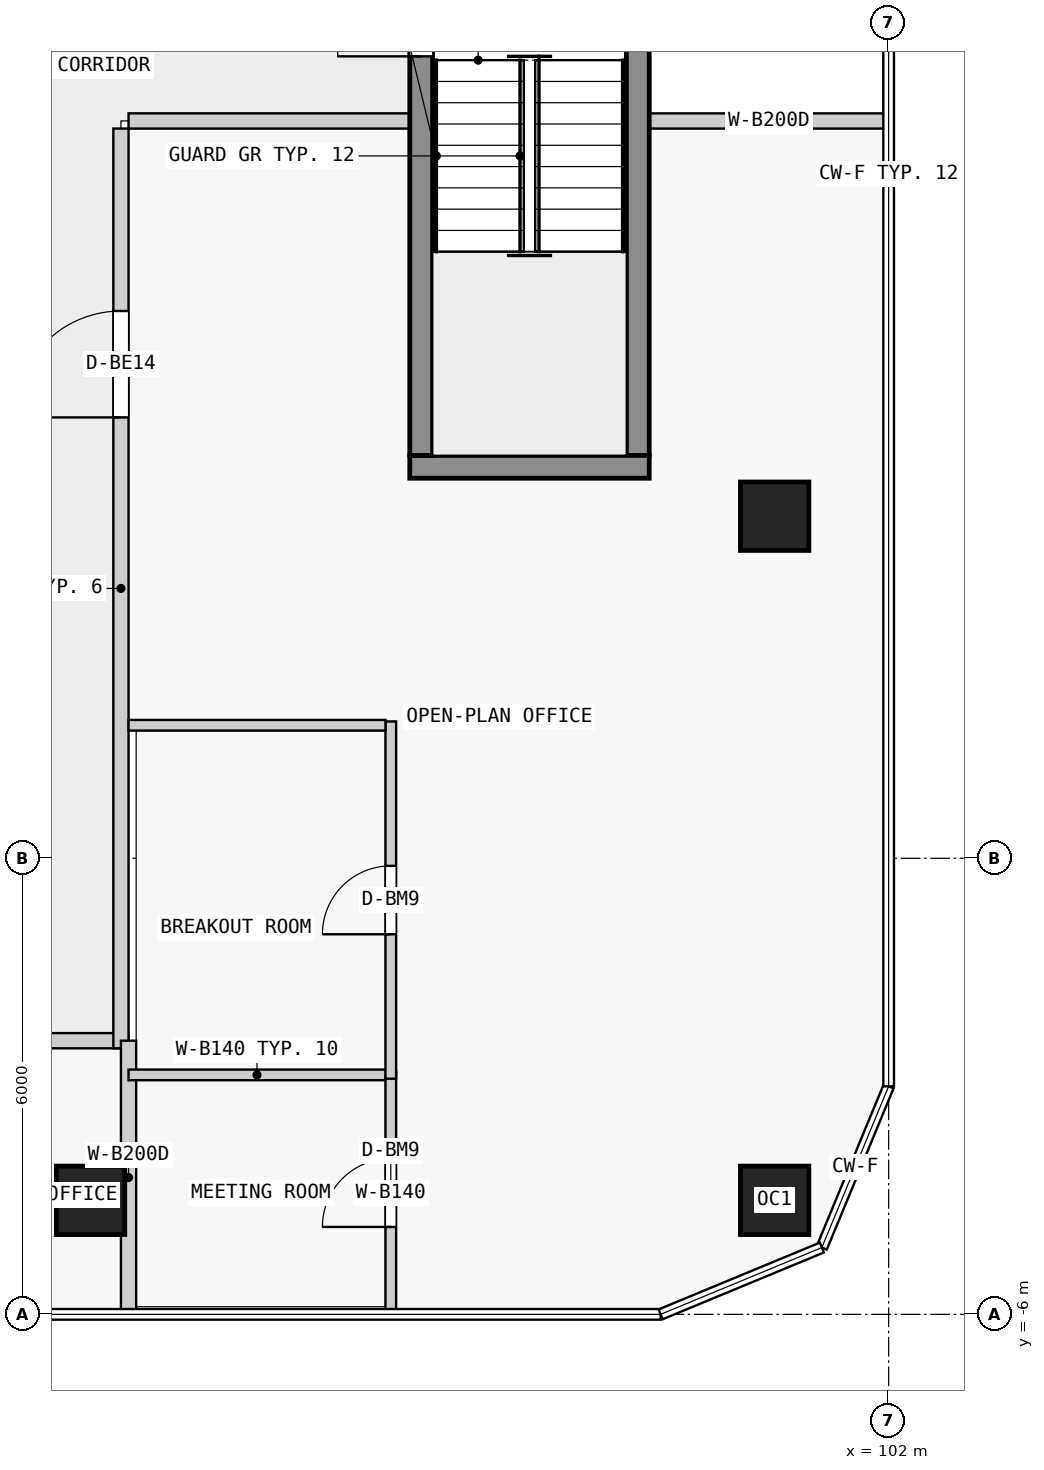
"""IFC4 building model, lengths in metres.
Left out: names, types, materials, properties, quantities, classifications, styles, units other than length and angle.
Written with IfcOpenShell. Run it as: python <this file> out.ifc"""

import sys

from ifc_helpers import new_model, si_unit, direction, frame, frame_2d, origin, origin_2d, place, context, subcontext, project, spatial, rectangle, extrude, element, fill, save


model = new_model("IFC4")
c1 = context("Model", 3, precision=1e-05, world=origin(), true_north=direction((0.0, 1.0)))
c2 = subcontext(c1, "Body", "Model", "MODEL_VIEW")
j1 = project(units=[si_unit("LENGTHUNIT", "METRE"), si_unit("PLANEANGLEUNIT", "RADIAN")], contexts=[c1])
p1 = place(None, origin())
s1 = spatial("IfcSite", under=j1, at=p1, CompositionType="ELEMENT")
p2 = place(p1, origin())
s2 = spatial("IfcBuilding", under=s1, at=p2, CompositionType="ELEMENT")
p3 = place(p2, frame((0.0, 0.0, 109.8)))
s3 = spatial("IfcBuildingStorey", under=s2, at=p3, CompositionType="ELEMENT", Elevation=109.8)
for number, where, z_axis, x_axis in (
    (1, (91.5, -4.5, 0.0), (0.0, 0.0, 1.0), (1.0, 0.0, 0.0)),
    (2, (100.5, -4.5, 0.0), (0.0, 0.0, 1.0), (1.0, 0.0, 0.0)),
    (3, (100.5, 4.5, 0.0), (0.0, 0.0, 1.0), (1.0, 0.0, 0.0)),
):
    element("IfcColumn", number, at=place(p3, frame(where, z_axis=z_axis, x_axis=x_axis)), inside=s3, PredefinedType="COLUMN", context=c2, shape_type="SweptSolid", body=[
        extrude(rectangle(XDim=0.9, YDim=0.9, at=origin_2d()), origin(), (0.0, 0.0, 1.0), 3.5),
    ])
p4 = place(p3, frame((95.85, 5.3, 0.0), z_axis=(0.0, 0.0, 1.0), x_axis=(0.0, 1.0, 0.0)))
e4 = element("IfcWall", 4, at=p4, inside=s3, PredefinedType="SHEAR", context=c2, shape_type="SweptSolid", body=[
    extrude(rectangle(XDim=6.4, YDim=0.3, at=frame_2d((3.2, 0.0))), origin(), (0.0, 0.0, 1.0), 3.25),
])
p5 = place(p4, frame((5.25, 0.0, 0.0)))
e5 = element("IfcOpeningElement", 5, at=p5, cuts=e4, PredefinedType="OPENING", context=c2, shape_type="SweptSolid", body=[
    extrude(rectangle(XDim=1.1, YDim=2.1, at=frame_2d((0.55, 1.05))), frame((0.0, 0.16, 0.0), z_axis=(0.0, -1.0, 0.0), x_axis=(1.0, 0.0, 0.0)), (0.0, 0.0, 1.0), 0.32),
])
p6 = place(p3, frame((98.7, 5.3, 0.0), z_axis=(0.0, 0.0, 1.0), x_axis=(0.0, 1.0, 0.0)))
e6 = element("IfcWall", 6, at=p6, inside=s3, PredefinedType="SHEAR", context=c2, shape_type="SweptSolid", body=[
    extrude(rectangle(XDim=6.4, YDim=0.3, at=frame_2d((3.2, 0.0))), origin(), (0.0, 0.0, 1.0), 3.25),
])
p7 = place(p3, frame((95.7, 5.15, 0.0), z_axis=(0.0, 0.0, 1.0), x_axis=(1.0, 0.0, 0.0)))
e7 = element("IfcWall", 7, at=p7, inside=s3, PredefinedType="SHEAR", context=c2, shape_type="SweptSolid", body=[
    extrude(rectangle(XDim=3.15, YDim=0.3, at=frame_2d((1.575, 0.0))), origin(), (0.0, 0.0, 1.0), 3.25),
])
p8 = place(p3, frame((72.0, -2.4, 0.0), z_axis=(0.0, 0.0, 1.0), x_axis=(1.0, 0.0, 0.0)))
e8 = element("IfcWall", 8, at=p8, inside=s3, PredefinedType="PARTITIONING", context=c2, shape_type="SweptSolid", body=[
    extrude(rectangle(XDim=20.0, YDim=0.2, at=frame_2d((10.0, 0.0))), origin(), (0.0, 0.0, 1.0), 3.25),
])
p9 = place(p8, frame((11.5, 0.0, 0.0)))
e9 = element("IfcOpeningElement", 9, at=p9, cuts=e8, PredefinedType="OPENING", context=c2, shape_type="SweptSolid", body=[
    extrude(rectangle(XDim=1.0, YDim=2.4, at=frame_2d((0.5, 1.2))), frame((0.0, 0.11, 0.0), z_axis=(0.0, -1.0, 0.0), x_axis=(1.0, 0.0, 0.0)), (0.0, 0.0, 1.0), 0.22),
])
p10 = place(p3, frame((91.9, -2.5, 0.0), z_axis=(0.0, 0.0, 1.0), x_axis=(0.0, 1.0, 0.0)))
e10 = element("IfcWall", 10, at=p10, inside=s3, PredefinedType="PARTITIONING", context=c2, shape_type="SweptSolid", body=[
    extrude(rectangle(XDim=12.1, YDim=0.2, at=frame_2d((6.05, 0.0))), origin(), (0.0, 0.0, 1.0), 3.25),
])
p11 = place(p10, frame((8.3, 0.0, 0.0)))
e11 = element("IfcOpeningElement", 11, at=p11, cuts=e10, PredefinedType="OPENING", context=c2, shape_type="SweptSolid", body=[
    extrude(rectangle(XDim=1.4, YDim=2.4, at=frame_2d((0.7, 1.2))), frame((0.0, 0.11, 0.0), z_axis=(0.0, -1.0, 0.0), x_axis=(1.0, 0.0, 0.0)), (0.0, 0.0, 1.0), 0.22),
])
p12 = place(p3, frame((92.0, 9.7, 0.0), z_axis=(0.0, 0.0, 1.0), x_axis=(1.0, 0.0, 0.0)))
e12 = element("IfcWall", 12, at=p12, inside=s3, PredefinedType="PARTITIONING", context=c2, shape_type="SweptSolid", body=[
    extrude(rectangle(XDim=3.7, YDim=0.2, at=frame_2d((1.85, 0.0))), origin(), (0.0, 0.0, 1.0), 3.25),
])
p13 = place(p3, frame((98.85, 9.7, 0.0), z_axis=(0.0, 0.0, 1.0), x_axis=(1.0, 0.0, 0.0)))
e13 = element("IfcWall", 13, at=p13, inside=s3, PredefinedType="PARTITIONING", context=c2, shape_type="SweptSolid", body=[
    extrude(rectangle(XDim=3.15, YDim=0.2, at=frame_2d((1.575, 0.0))), origin(), (0.0, 0.0, 1.0), 3.25),
])
p14 = place(p3, frame((92.0, -6.0, 0.0), z_axis=(0.0, 0.0, 1.0), x_axis=(0.0, 1.0, 0.0)))
e14 = element("IfcWall", 14, at=p14, inside=s3, PredefinedType="PARTITIONING", context=c2, shape_type="SweptSolid", body=[
    extrude(rectangle(XDim=3.6, YDim=0.2, at=frame_2d((1.8, 0.0))), origin(), (0.0, 0.0, 1.0), 3.25),
])
p15 = place(p3, frame((95.45, -6.0, 0.0), z_axis=(0.0, 0.0, 1.0), x_axis=(0.0, 1.0, 0.0)))
e15 = element("IfcWall", 15, at=p15, inside=s3, PredefinedType="PARTITIONING", context=c2, shape_type="SweptSolid", body=[
    extrude(rectangle(XDim=3.2, YDim=0.14, at=frame_2d((1.6, 0.0))), origin(), (0.0, 0.0, 1.0), 3.25),
])
p16 = place(p15, frame((1.15, 0.0, 0.0)))
e16 = element("IfcOpeningElement", 16, at=p16, cuts=e15, PredefinedType="OPENING", context=c2, shape_type="SweptSolid", body=[
    extrude(rectangle(XDim=0.9, YDim=2.4, at=frame_2d((0.45, 1.2))), frame((0.0, 0.08, 0.0), z_axis=(0.0, -1.0, 0.0), x_axis=(1.0, 0.0, 0.0)), (0.0, 0.0, 1.0), 0.16),
])
p17 = place(p3, frame((92.0, -2.85, 0.0), z_axis=(0.0, 0.0, 1.0), x_axis=(1.0, 0.0, 0.0)))
e17 = element("IfcWall", 17, at=p17, inside=s3, PredefinedType="PARTITIONING", context=c2, shape_type="SweptSolid", body=[
    extrude(rectangle(XDim=3.38, YDim=0.14, at=frame_2d((1.69, 0.0))), origin(), (0.0, 0.0, 1.0), 3.25),
])
p18 = place(p3, frame((95.45, -2.9, 0.0), z_axis=(0.0, 0.0, 1.0), x_axis=(0.0, 1.0, 0.0)))
e18 = element("IfcWall", 18, at=p18, inside=s3, PredefinedType="PARTITIONING", context=c2, shape_type="SweptSolid", body=[
    extrude(rectangle(XDim=4.7, YDim=0.14, at=frame_2d((2.35, 0.0))), origin(), (0.0, 0.0, 1.0), 3.25),
])
p19 = place(p18, frame((1.9, 0.0, 0.0)))
e19 = element("IfcOpeningElement", 19, at=p19, cuts=e18, PredefinedType="OPENING", context=c2, shape_type="SweptSolid", body=[
    extrude(rectangle(XDim=0.9, YDim=2.4, at=frame_2d((0.45, 1.2))), frame((0.0, 0.08, 0.0), z_axis=(0.0, -1.0, 0.0), x_axis=(1.0, 0.0, 0.0)), (0.0, 0.0, 1.0), 0.16),
])
p20 = place(p3, frame((92.0, 1.75, 0.0), z_axis=(0.0, 0.0, 1.0), x_axis=(1.0, 0.0, 0.0)))
e20 = element("IfcWall", 20, at=p20, inside=s3, PredefinedType="PARTITIONING", context=c2, shape_type="SweptSolid", body=[
    extrude(rectangle(XDim=3.38, YDim=0.14, at=frame_2d((1.69, 0.0))), origin(), (0.0, 0.0, 1.0), 3.25),
])
p21 = place(p5, origin())
e21 = element("IfcDoor", 21, at=p21, inside=s3, OperationType="SINGLE_SWING_LEFT", PredefinedType="DOOR", context=c2, shape_type="SweptSolid", body=[
    extrude(rectangle(XDim=1.1, YDim=2.1, at=frame_2d((0.55, 1.05))), frame((0.0, 0.025, 0.0), z_axis=(0.0, -1.0, 0.0), x_axis=(1.0, 0.0, 0.0)), (0.0, 0.0, 1.0), 0.05),
])
fill(e5, e21)
p22 = place(p11, origin())
e22 = element("IfcDoor", 22, at=p22, inside=s3, OperationType="DOUBLE_DOOR_SINGLE_SWING", PredefinedType="DOOR", context=c2, shape_type="SweptSolid", body=[
    extrude(rectangle(XDim=1.4, YDim=2.4, at=frame_2d((0.7, 1.2))), frame((0.0, 0.025, 0.0), z_axis=(0.0, -1.0, 0.0), x_axis=(1.0, 0.0, 0.0)), (0.0, 0.0, 1.0), 0.05),
])
fill(e11, e22)
p23 = place(p16, origin())
e23 = element("IfcDoor", 23, at=p23, inside=s3, OperationType="SINGLE_SWING_LEFT", PredefinedType="DOOR", context=c2, shape_type="SweptSolid", body=[
    extrude(rectangle(XDim=0.9, YDim=2.4, at=frame_2d((0.45, 1.2))), frame((0.0, 0.025, 0.0), z_axis=(0.0, -1.0, 0.0), x_axis=(1.0, 0.0, 0.0)), (0.0, 0.0, 1.0), 0.05),
])
fill(e16, e23)
p24 = place(p19, origin())
e24 = element("IfcDoor", 24, at=p24, inside=s3, OperationType="SINGLE_SWING_LEFT", PredefinedType="DOOR", context=c2, shape_type="SweptSolid", body=[
    extrude(rectangle(XDim=0.9, YDim=2.4, at=frame_2d((0.45, 1.2))), frame((0.0, 0.025, 0.0), z_axis=(0.0, -1.0, 0.0), x_axis=(1.0, 0.0, 0.0)), (0.0, 0.0, 1.0), 0.05),
])
fill(e19, e24)
save(model, sys.argv[1])
